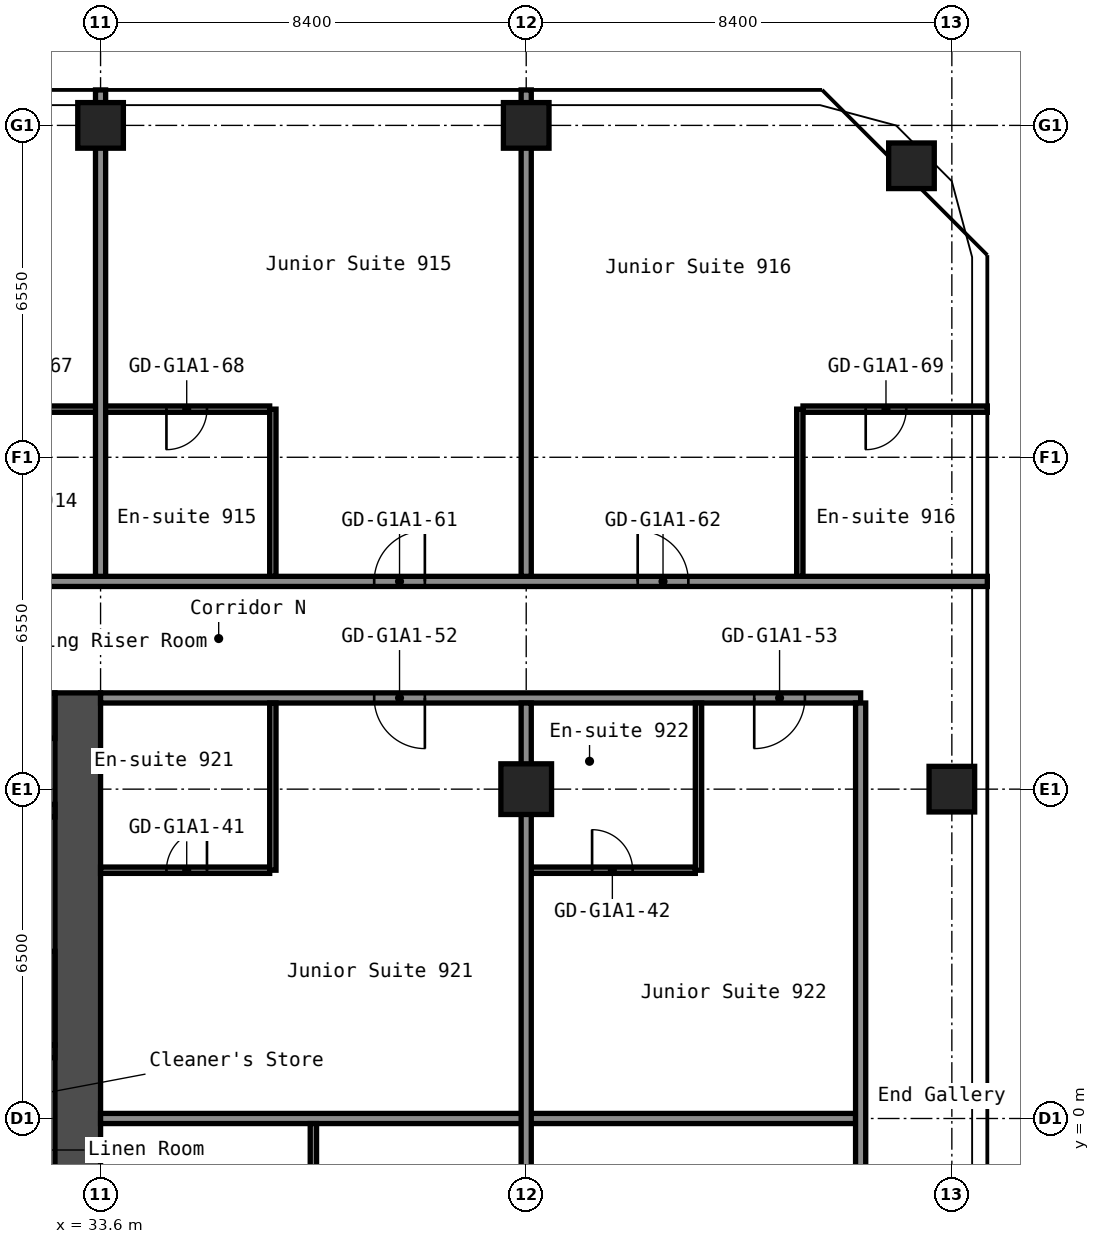
"""IFC4 building model, lengths in metres.
Left out: names, types, materials, properties, quantities, classifications, styles, units other than length and angle.
Written with IfcOpenShell. Run it as: python <this file> out.ifc"""

import sys

from ifc_helpers import new_model, si_unit, direction, frame, frame_2d, origin, origin_2d, place, context, subcontext, project, spatial, rectangle, hollow_rectangle, extrude, element, fill, save


model = new_model("IFC4")
c1 = context("Model", 3, precision=1e-05, world=origin(), true_north=direction((0.0, 1.0)))
c2 = subcontext(c1, "Body", "Model", "MODEL_VIEW")
j1 = project(units=[si_unit("LENGTHUNIT", "METRE"), si_unit("PLANEANGLEUNIT", "RADIAN")], contexts=[c1])
p1 = place(None, origin())
s1 = spatial("IfcSite", under=j1, at=p1, CompositionType="ELEMENT")
p2 = place(p1, origin())
s2 = spatial("IfcBuilding", under=s1, at=p2, CompositionType="ELEMENT")
p3 = place(p2, frame((0.0, 0.0, 35.8)))
s3 = spatial("IfcBuildingStorey", under=s2, at=p3, CompositionType="ELEMENT", Elevation=35.8)
p4 = place(p3, frame((33.6, 19.6, 0.0), z_axis=(0.0, 0.0, 1.0), x_axis=(1.0, 0.0, 0.0)))
e1 = element("IfcColumn", 1, at=p4, inside=s3, PredefinedType="COLUMN", context=c2, shape_type="SweptSolid", body=[
    extrude(hollow_rectangle(XDim=0.9, YDim=0.9, WallThickness=0.036, at=origin_2d()), origin(), (0.0, 0.0, 1.0), 2.8),
])
p5 = place(p3, frame((42.0, 6.5, 0.0), z_axis=(0.0, 0.0, 1.0), x_axis=(1.0, 0.0, 0.0)))
e2 = element("IfcColumn", 2, at=p5, inside=s3, PredefinedType="COLUMN", context=c2, shape_type="SweptSolid", body=[
    extrude(hollow_rectangle(XDim=1.0, YDim=1.0, WallThickness=0.04, at=origin_2d()), origin(), (0.0, 0.0, 1.0), 2.8),
])
for number, where, z_axis, x_axis in (
    (3, (42.0, 19.6, 0.0), (0.0, 0.0, 1.0), (1.0, 0.0, 0.0)),
    (4, (50.4, 6.5, 0.0), (0.0, 0.0, 1.0), (1.0, 0.0, 0.0)),
    (5, (49.603, 18.803, 0.0), (0.0, 0.0, 1.0), (1.0, 0.0, 0.0)),
):
    element("IfcColumn", number, at=place(p3, frame(where, z_axis=z_axis, x_axis=x_axis)), inside=s3, PredefinedType="COLUMN", context=c2, shape_type="SweptSolid", body=[
        extrude(hollow_rectangle(XDim=0.9, YDim=0.9, WallThickness=0.036, at=origin_2d()), origin(), (0.0, 0.0, 1.0), 2.8),
    ])
p6 = place(p3, frame((33.15, -8.4, 0.0), z_axis=(0.0, 0.0, 1.0), x_axis=(0.0, 1.0, 0.0)))
e6 = element("IfcWall", 6, at=p6, inside=s3, PredefinedType="SHEAR", context=c2, shape_type="SweptSolid", body=[
    extrude(rectangle(XDim=16.8, YDim=0.9, at=frame_2d((8.4, 0.0))), origin(), (0.0, 0.0, 1.0), 2.8),
])
p7 = place(p3, frame((17.7, 7.95, 0.0), z_axis=(0.0, 0.0, 1.0), x_axis=(1.0, 0.0, 0.0)))
e7 = element("IfcWall", 7, at=p7, inside=s3, PredefinedType="SHEAR", context=c2, shape_type="SweptSolid", body=[
    extrude(rectangle(XDim=15.0, YDim=0.9, at=frame_2d((7.5, 0.0))), origin(), (0.0, 0.0, 1.0), 2.8),
])
p8 = place(p7, frame((10.4, 0.0, 0.0)))
e8 = element("IfcOpeningElement", 8, at=p8, cuts=e7, PredefinedType="OPENING", context=c2, shape_type="SweptSolid", body=[
    extrude(rectangle(XDim=1.2, YDim=2.1, at=frame_2d((0.6, 1.05))), frame((0.0, 0.46, 0.0), z_axis=(0.0, -1.0, 0.0), x_axis=(1.0, 0.0, 0.0)), (0.0, 0.0, 1.0), 0.92),
])
p9 = place(p7, frame((13.35, 0.0, 0.0)))
e9 = element("IfcOpeningElement", 9, at=p9, cuts=e7, PredefinedType="OPENING", context=c2, shape_type="SweptSolid", body=[
    extrude(rectangle(XDim=0.9, YDim=2.1, at=frame_2d((0.45, 1.05))), frame((0.0, 0.46, 0.0), z_axis=(0.0, -1.0, 0.0), x_axis=(1.0, 0.0, 0.0)), (0.0, 0.0, 1.0), 0.92),
])
p10 = place(p3, frame((27.65, 1.325, 0.0), z_axis=(0.0, 0.0, 1.0), x_axis=(1.0, 0.0, 0.0)))
e10 = element("IfcWall", 10, at=p10, inside=s3, PredefinedType="SHEAR", context=c2, shape_type="SweptSolid", body=[
    extrude(rectangle(XDim=5.05, YDim=0.25, at=frame_2d((2.525, 0.0))), origin(), (0.0, 0.0, 1.0), 2.8),
])
p11 = place(p10, frame((0.55, 0.0, 0.0)))
e11 = element("IfcOpeningElement", 11, at=p11, cuts=e10, PredefinedType="OPENING", context=c2, shape_type="SweptSolid", body=[
    extrude(rectangle(XDim=1.2, YDim=2.1, at=frame_2d((0.6, 1.05))), frame((0.0, 0.135, 0.0), z_axis=(0.0, -1.0, 0.0), x_axis=(1.0, 0.0, 0.0)), (0.0, 0.0, 1.0), 0.27),
])
p12 = place(p3, frame((30.3, 2.375, 0.0), z_axis=(0.0, 0.0, 1.0), x_axis=(1.0, 0.0, 0.0)))
e12 = element("IfcWall", 12, at=p12, inside=s3, PredefinedType="SHEAR", context=c2, shape_type="SweptSolid", body=[
    extrude(rectangle(XDim=2.4, YDim=1.85, at=frame_2d((1.2, 0.0))), origin(), (0.0, 0.0, 1.0), 2.8),
])
p13 = place(p3, frame((30.3, 6.075, 0.0), z_axis=(0.0, 0.0, 1.0), x_axis=(1.0, 0.0, 0.0)))
e13 = element("IfcWall", 13, at=p13, inside=s3, PredefinedType="SHEAR", context=c2, shape_type="SweptSolid", body=[
    extrude(rectangle(XDim=2.4, YDim=0.25, at=frame_2d((1.2, 0.0))), origin(), (0.0, 0.0, 1.0), 2.8),
])
p14 = place(p3, frame((33.6, 0.0, 0.0), z_axis=(0.0, 0.0, 1.0), x_axis=(1.0, 0.0, 0.0)))
e14 = element("IfcWall", 14, at=p14, inside=s3, PredefinedType="PARTITIONING", context=c2, shape_type="SweptSolid", body=[
    extrude(rectangle(XDim=14.9, YDim=0.2, at=frame_2d((7.45, 0.0))), origin(), (0.0, 0.0, 1.0), 2.8),
])
p15 = place(p3, frame((33.6, 4.9, 0.0), z_axis=(0.0, 0.0, 1.0), x_axis=(1.0, 0.0, 0.0)))
e15 = element("IfcWall", 15, at=p15, inside=s3, PredefinedType="PARTITIONING", context=c2, shape_type="SweptSolid", body=[
    extrude(rectangle(XDim=3.337, YDim=0.125, at=frame_2d((1.669, 0.0))), origin(), (0.0, 0.0, 1.0), 2.8),
])
p16 = place(p15, frame((1.3, 0.0, 0.0)))
e16 = element("IfcOpeningElement", 16, at=p16, cuts=e15, PredefinedType="OPENING", context=c2, shape_type="SweptSolid", body=[
    extrude(rectangle(XDim=0.8, YDim=2.1, at=frame_2d((0.4, 1.05))), frame((0.0, 0.073, 0.0), z_axis=(0.0, -1.0, 0.0), x_axis=(1.0, 0.0, 0.0)), (0.0, 0.0, 1.0), 0.145),
])
p17 = place(p3, frame((42.1, 4.9, 0.0), z_axis=(0.0, 0.0, 1.0), x_axis=(1.0, 0.0, 0.0)))
e17 = element("IfcWall", 17, at=p17, inside=s3, PredefinedType="PARTITIONING", context=c2, shape_type="SweptSolid", body=[
    extrude(rectangle(XDim=3.237, YDim=0.125, at=frame_2d((1.619, 0.0))), origin(), (0.0, 0.0, 1.0), 2.8),
])
p18 = place(p17, frame((1.2, 0.0, 0.0)))
e18 = element("IfcOpeningElement", 18, at=p18, cuts=e17, PredefinedType="OPENING", context=c2, shape_type="SweptSolid", body=[
    extrude(rectangle(XDim=0.8, YDim=2.1, at=frame_2d((0.4, 1.05))), frame((0.0, 0.073, 0.0), z_axis=(0.0, -1.0, 0.0), x_axis=(1.0, 0.0, 0.0)), (0.0, 0.0, 1.0), 0.145),
])
p19 = place(p3, frame((33.6, 8.3, 0.0), z_axis=(0.0, 0.0, 1.0), x_axis=(1.0, 0.0, 0.0)))
e19 = element("IfcWall", 19, at=p19, inside=s3, PredefinedType="PARTITIONING", context=c2, shape_type="SweptSolid", body=[
    extrude(rectangle(XDim=15.0, YDim=0.2, at=frame_2d((7.5, 0.0))), origin(), (0.0, 0.0, 1.0), 2.8),
])
p20 = place(p19, frame((5.4, 0.0, 0.0)))
e20 = element("IfcOpeningElement", 20, at=p20, cuts=e19, PredefinedType="OPENING", context=c2, shape_type="SweptSolid", body=[
    extrude(rectangle(XDim=1.0, YDim=2.1, at=frame_2d((0.5, 1.05))), frame((0.0, 0.11, 0.0), z_axis=(0.0, -1.0, 0.0), x_axis=(1.0, 0.0, 0.0)), (0.0, 0.0, 1.0), 0.22),
])
p21 = place(p19, frame((12.9, 0.0, 0.0)))
e21 = element("IfcOpeningElement", 21, at=p21, cuts=e19, PredefinedType="OPENING", context=c2, shape_type="SweptSolid", body=[
    extrude(rectangle(XDim=1.0, YDim=2.1, at=frame_2d((0.5, 1.05))), frame((0.0, 0.11, 0.0), z_axis=(0.0, -1.0, 0.0), x_axis=(1.0, 0.0, 0.0)), (0.0, 0.0, 1.0), 0.22),
])
p22 = place(p3, frame((16.8, 10.6, 0.0), z_axis=(0.0, 0.0, 1.0), x_axis=(1.0, 0.0, 0.0)))
e22 = element("IfcWall", 22, at=p22, inside=s3, PredefinedType="PARTITIONING", context=c2, shape_type="SweptSolid", body=[
    extrude(rectangle(XDim=34.3, YDim=0.2, at=frame_2d((17.15, 0.0))), origin(), (0.0, 0.0, 1.0), 2.8),
])
p23 = place(p22, frame((5.4, 0.0, 0.0)))
e23 = element("IfcOpeningElement", 23, at=p23, cuts=e22, PredefinedType="OPENING", context=c2, shape_type="SweptSolid", body=[
    extrude(rectangle(XDim=1.0, YDim=2.1, at=frame_2d((0.5, 1.05))), frame((0.0, 0.11, 0.0), z_axis=(0.0, -1.0, 0.0), x_axis=(1.0, 0.0, 0.0)), (0.0, 0.0, 1.0), 0.22),
])
p24 = place(p22, frame((10.4, 0.0, 0.0)))
e24 = element("IfcOpeningElement", 24, at=p24, cuts=e22, PredefinedType="OPENING", context=c2, shape_type="SweptSolid", body=[
    extrude(rectangle(XDim=1.0, YDim=2.1, at=frame_2d((0.5, 1.05))), frame((0.0, 0.11, 0.0), z_axis=(0.0, -1.0, 0.0), x_axis=(1.0, 0.0, 0.0)), (0.0, 0.0, 1.0), 0.22),
])
p25 = place(p22, frame((22.2, 0.0, 0.0)))
e25 = element("IfcOpeningElement", 25, at=p25, cuts=e22, PredefinedType="OPENING", context=c2, shape_type="SweptSolid", body=[
    extrude(rectangle(XDim=1.0, YDim=2.1, at=frame_2d((0.5, 1.05))), frame((0.0, 0.11, 0.0), z_axis=(0.0, -1.0, 0.0), x_axis=(1.0, 0.0, 0.0)), (0.0, 0.0, 1.0), 0.22),
])
p26 = place(p22, frame((27.4, 0.0, 0.0)))
e26 = element("IfcOpeningElement", 26, at=p26, cuts=e22, PredefinedType="OPENING", context=c2, shape_type="SweptSolid", body=[
    extrude(rectangle(XDim=1.0, YDim=2.1, at=frame_2d((0.5, 1.05))), frame((0.0, 0.11, 0.0), z_axis=(0.0, -1.0, 0.0), x_axis=(1.0, 0.0, 0.0)), (0.0, 0.0, 1.0), 0.22),
])
p27 = place(p3, frame((30.262, 14.0, 0.0), z_axis=(0.0, 0.0, 1.0), x_axis=(1.0, 0.0, 0.0)))
e27 = element("IfcWall", 27, at=p27, inside=s3, PredefinedType="PARTITIONING", context=c2, shape_type="SweptSolid", body=[
    extrude(rectangle(XDim=6.675, YDim=0.125, at=frame_2d((3.337, 0.0))), origin(), (0.0, 0.0, 1.0), 2.8),
])
p28 = place(p27, frame((1.238, 0.0, 0.0)))
e28 = element("IfcOpeningElement", 28, at=p28, cuts=e27, PredefinedType="OPENING", context=c2, shape_type="SweptSolid", body=[
    extrude(rectangle(XDim=0.8, YDim=2.1, at=frame_2d((0.4, 1.05))), frame((0.0, 0.073, 0.0), z_axis=(0.0, -1.0, 0.0), x_axis=(1.0, 0.0, 0.0)), (0.0, 0.0, 1.0), 0.145),
])
p29 = place(p27, frame((4.637, 0.0, 0.0)))
e29 = element("IfcOpeningElement", 29, at=p29, cuts=e27, PredefinedType="OPENING", context=c2, shape_type="SweptSolid", body=[
    extrude(rectangle(XDim=0.8, YDim=2.1, at=frame_2d((0.4, 1.05))), frame((0.0, 0.073, 0.0), z_axis=(0.0, -1.0, 0.0), x_axis=(1.0, 0.0, 0.0)), (0.0, 0.0, 1.0), 0.145),
])
p30 = place(p3, frame((47.462, 14.0, 0.0), z_axis=(0.0, 0.0, 1.0), x_axis=(1.0, 0.0, 0.0)))
e30 = element("IfcWall", 30, at=p30, inside=s3, PredefinedType="PARTITIONING", context=c2, shape_type="SweptSolid", body=[
    extrude(rectangle(XDim=3.638, YDim=0.125, at=frame_2d((1.819, 0.0))), origin(), (0.0, 0.0, 1.0), 2.8),
])
p31 = place(p30, frame((1.238, 0.0, 0.0)))
e31 = element("IfcOpeningElement", 31, at=p31, cuts=e30, PredefinedType="OPENING", context=c2, shape_type="SweptSolid", body=[
    extrude(rectangle(XDim=0.8, YDim=2.1, at=frame_2d((0.4, 1.05))), frame((0.0, 0.073, 0.0), z_axis=(0.0, -1.0, 0.0), x_axis=(1.0, 0.0, 0.0)), (0.0, 0.0, 1.0), 0.145),
])
p32 = place(p3, frame((33.6, 10.7, 0.0), z_axis=(0.0, 0.0, 1.0), x_axis=(0.0, 1.0, 0.0)))
e32 = element("IfcWall", 32, at=p32, inside=s3, PredefinedType="PARTITIONING", context=c2, shape_type="SweptSolid", body=[
    extrude(rectangle(XDim=9.6, YDim=0.2, at=frame_2d((4.8, 0.0))), origin(), (0.0, 0.0, 1.0), 2.8),
])
for number, where, z_axis, x_axis in (
    (33, (37.0, 4.9, 0.0), (0.0, 0.0, 1.0), (0.0, 1.0, 0.0)),
    (34, (37.0, 10.7, 0.0), (0.0, 0.0, 1.0), (0.0, 1.0, 0.0)),
):
    element("IfcWall", number, at=place(p3, frame(where, z_axis=z_axis, x_axis=x_axis)), inside=s3, PredefinedType="PARTITIONING", context=c2, shape_type="SweptSolid", body=[
        extrude(rectangle(XDim=3.3, YDim=0.125, at=frame_2d((1.65, 0.0))), origin(), (0.0, 0.0, 1.0), 2.8),
    ])
p33 = place(p3, frame((37.8, -8.2, 0.0), z_axis=(0.0, 0.0, 1.0), x_axis=(0.0, 1.0, 0.0)))
e35 = element("IfcWall", 35, at=p33, inside=s3, PredefinedType="PARTITIONING", context=c2, shape_type="SweptSolid", body=[
    extrude(rectangle(XDim=8.1, YDim=0.125, at=frame_2d((4.05, 0.0))), origin(), (0.0, 0.0, 1.0), 2.8),
])
p34 = place(p33, frame((4.05, 0.0, 0.0)))
e36 = element("IfcOpeningElement", 36, at=p34, cuts=e35, PredefinedType="OPENING", context=c2, shape_type="SweptSolid", body=[
    extrude(rectangle(XDim=0.9, YDim=2.1, at=frame_2d((0.45, 1.05))), frame((0.0, 0.073, 0.0), z_axis=(0.0, -1.0, 0.0), x_axis=(1.0, 0.0, 0.0)), (0.0, 0.0, 1.0), 0.145),
])
p35 = place(p3, frame((42.0, -8.2, 0.0), z_axis=(0.0, 0.0, 1.0), x_axis=(0.0, 1.0, 0.0)))
e37 = element("IfcWall", 37, at=p35, inside=s3, PredefinedType="PARTITIONING", context=c2, shape_type="SweptSolid", body=[
    extrude(rectangle(XDim=16.4, YDim=0.2, at=frame_2d((8.2, 0.0))), origin(), (0.0, 0.0, 1.0), 2.8),
])
p36 = place(p3, frame((42.0, 10.7, 0.0), z_axis=(0.0, 0.0, 1.0), x_axis=(0.0, 1.0, 0.0)))
e38 = element("IfcWall", 38, at=p36, inside=s3, PredefinedType="PARTITIONING", context=c2, shape_type="SweptSolid", body=[
    extrude(rectangle(XDim=9.6, YDim=0.2, at=frame_2d((4.8, 0.0))), origin(), (0.0, 0.0, 1.0), 2.8),
])
for number, where, z_axis, x_axis in (
    (39, (45.4, 4.9, 0.0), (0.0, 0.0, 1.0), (0.0, 1.0, 0.0)),
    (40, (47.4, 10.7, 0.0), (0.0, 0.0, 1.0), (0.0, 1.0, 0.0)),
):
    element("IfcWall", number, at=place(p3, frame(where, z_axis=z_axis, x_axis=x_axis)), inside=s3, PredefinedType="PARTITIONING", context=c2, shape_type="SweptSolid", body=[
        extrude(rectangle(XDim=3.3, YDim=0.125, at=frame_2d((1.65, 0.0))), origin(), (0.0, 0.0, 1.0), 2.8),
    ])
p37 = place(p3, frame((48.6, -8.2, 0.0), z_axis=(0.0, 0.0, 1.0), x_axis=(0.0, 1.0, 0.0)))
e41 = element("IfcWall", 41, at=p37, inside=s3, PredefinedType="PARTITIONING", context=c2, shape_type="SweptSolid", body=[
    extrude(rectangle(XDim=16.4, YDim=0.2, at=frame_2d((8.2, 0.0))), origin(), (0.0, 0.0, 1.0), 2.8),
])
p38 = place(p16, origin())
e42 = element("IfcDoor", 42, at=p38, inside=s3, OperationType="SINGLE_SWING_LEFT", PredefinedType="DOOR", context=c2, shape_type="SweptSolid", body=[
    extrude(rectangle(XDim=0.8, YDim=2.1, at=frame_2d((0.4, 1.05))), frame((0.0, 0.025, 0.0), z_axis=(0.0, -1.0, 0.0), x_axis=(1.0, 0.0, 0.0)), (0.0, 0.0, 1.0), 0.05),
])
fill(e16, e42)
p39 = place(p18, origin())
e43 = element("IfcDoor", 43, at=p39, inside=s3, OperationType="SINGLE_SWING_RIGHT", PredefinedType="DOOR", context=c2, shape_type="SweptSolid", body=[
    extrude(rectangle(XDim=0.8, YDim=2.1, at=frame_2d((0.4, 1.05))), frame((0.0, 0.025, 0.0), z_axis=(0.0, -1.0, 0.0), x_axis=(1.0, 0.0, 0.0)), (0.0, 0.0, 1.0), 0.05),
])
fill(e18, e43)
p40 = place(p20, origin())
e44 = element("IfcDoor", 44, at=p40, inside=s3, OperationType="SINGLE_SWING_RIGHT", PredefinedType="DOOR", context=c2, shape_type="SweptSolid", body=[
    extrude(rectangle(XDim=1.0, YDim=2.1, at=frame_2d((0.5, 1.05))), frame((0.0, 0.025, 0.0), z_axis=(0.0, -1.0, 0.0), x_axis=(1.0, 0.0, 0.0)), (0.0, 0.0, 1.0), 0.05),
])
fill(e20, e44)
p41 = place(p21, origin())
e45 = element("IfcDoor", 45, at=p41, inside=s3, OperationType="SINGLE_SWING_LEFT", PredefinedType="DOOR", context=c2, shape_type="SweptSolid", body=[
    extrude(rectangle(XDim=1.0, YDim=2.1, at=frame_2d((0.5, 1.05))), frame((0.0, 0.025, 0.0), z_axis=(0.0, -1.0, 0.0), x_axis=(1.0, 0.0, 0.0)), (0.0, 0.0, 1.0), 0.05),
])
fill(e21, e45)
p42 = place(p25, origin())
e46 = element("IfcDoor", 46, at=p42, inside=s3, OperationType="SINGLE_SWING_LEFT", PredefinedType="DOOR", context=c2, shape_type="SweptSolid", body=[
    extrude(rectangle(XDim=1.0, YDim=2.1, at=frame_2d((0.5, 1.05))), frame((0.0, 0.025, 0.0), z_axis=(0.0, -1.0, 0.0), x_axis=(1.0, 0.0, 0.0)), (0.0, 0.0, 1.0), 0.05),
])
fill(e25, e46)
p43 = place(p26, origin())
e47 = element("IfcDoor", 47, at=p43, inside=s3, OperationType="SINGLE_SWING_RIGHT", PredefinedType="DOOR", context=c2, shape_type="SweptSolid", body=[
    extrude(rectangle(XDim=1.0, YDim=2.1, at=frame_2d((0.5, 1.05))), frame((0.0, 0.025, 0.0), z_axis=(0.0, -1.0, 0.0), x_axis=(1.0, 0.0, 0.0)), (0.0, 0.0, 1.0), 0.05),
])
fill(e26, e47)
p44 = place(p29, origin())
e48 = element("IfcDoor", 48, at=p44, inside=s3, OperationType="SINGLE_SWING_LEFT", PredefinedType="DOOR", context=c2, shape_type="SweptSolid", body=[
    extrude(rectangle(XDim=0.8, YDim=2.1, at=frame_2d((0.4, 1.05))), frame((0.0, 0.025, 0.0), z_axis=(0.0, -1.0, 0.0), x_axis=(1.0, 0.0, 0.0)), (0.0, 0.0, 1.0), 0.05),
])
fill(e29, e48)
p45 = place(p31, origin())
e49 = element("IfcDoor", 49, at=p45, inside=s3, OperationType="SINGLE_SWING_LEFT", PredefinedType="DOOR", context=c2, shape_type="SweptSolid", body=[
    extrude(rectangle(XDim=0.8, YDim=2.1, at=frame_2d((0.4, 1.05))), frame((0.0, 0.025, 0.0), z_axis=(0.0, -1.0, 0.0), x_axis=(1.0, 0.0, 0.0)), (0.0, 0.0, 1.0), 0.05),
])
fill(e31, e49)
save(model, sys.argv[1])
